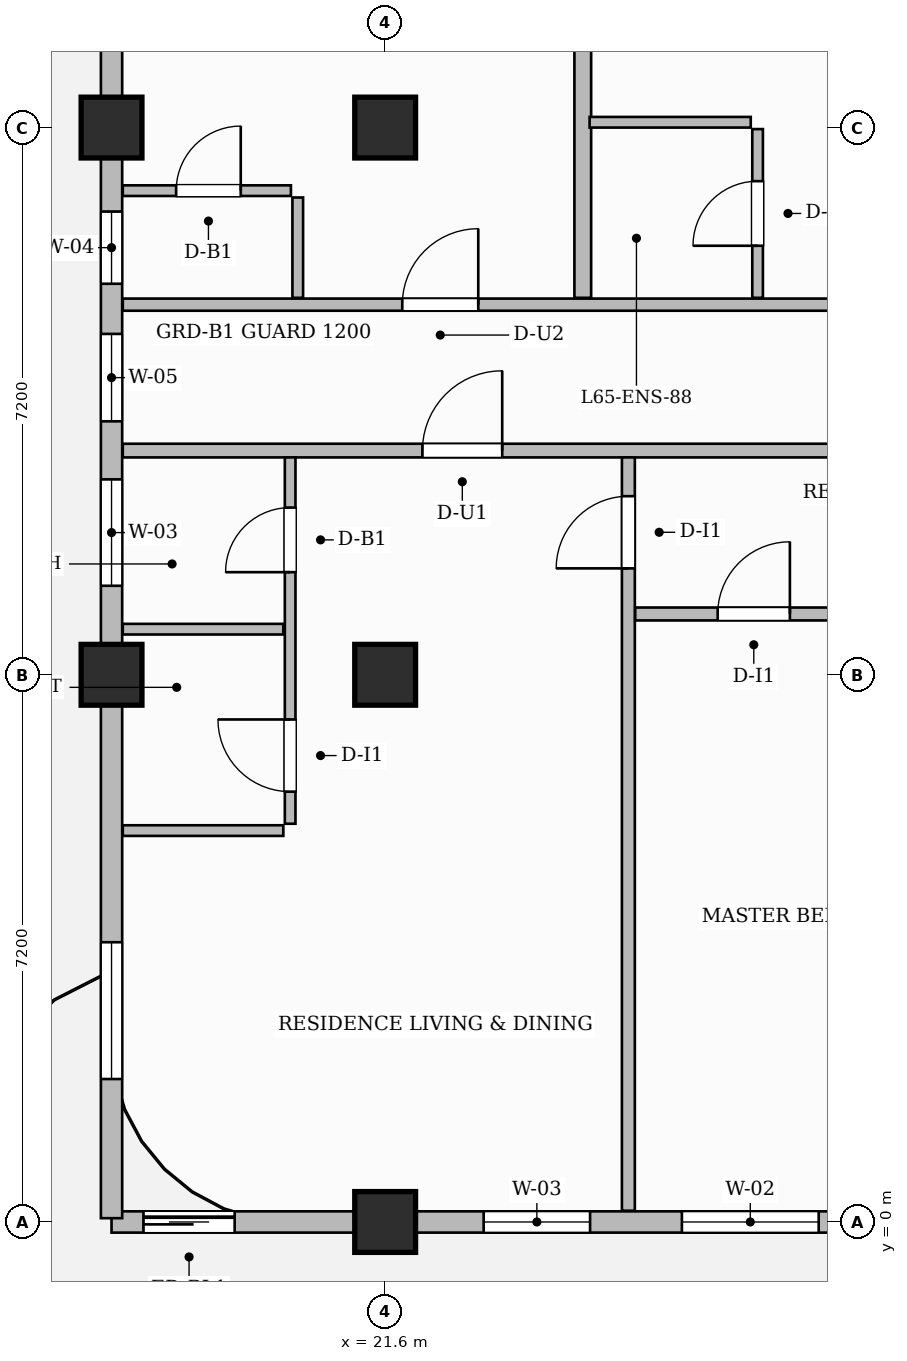
"""IFC4 building model, lengths in metres.
Left out: names, types, materials, properties, quantities, classifications, styles, units other than length and angle.
Written with IfcOpenShell. Run it as: python <this file> out.ifc"""

import sys

from ifc_helpers import new_model, si_unit, direction, frame, frame_2d, origin, origin_2d, place, context, subcontext, project, spatial, rectangle, extrude, source, transform, mapped, element, fill, save


model = new_model("IFC4")
c1 = context("Model", 3, precision=1e-05, world=origin(), true_north=direction((0.0, 1.0)))
c2 = subcontext(c1, "Body", "Model", "MODEL_VIEW")
j1 = project(units=[si_unit("LENGTHUNIT", "METRE"), si_unit("PLANEANGLEUNIT", "RADIAN")], contexts=[c1])
p1 = place(None, origin())
s1 = spatial("IfcSite", under=j1, at=p1, CompositionType="ELEMENT")
p2 = place(p1, origin())
s2 = spatial("IfcBuilding", under=s1, at=p2, CompositionType="ELEMENT")
p3 = place(p2, frame((0.0, 0.0, 259.65)))
s3 = spatial("IfcBuildingStorey", under=s2, at=p3, CompositionType="ELEMENT", Elevation=259.65)
m1 = source(origin(), c2, "Body", "SweptSolid", [
    extrude(rectangle(XDim=0.8, YDim=0.8, at=origin_2d()), origin(), (0.0, 0.0, 1.0), 3.85),
])
for number, where, z_axis, x_axis in (
    (1, (21.6, 0.0, 0.0), (0.0, 0.0, 1.0), (1.0, 0.0, 0.0)),
    (2, (21.6, 7.2, 0.0), (0.0, 0.0, 1.0), (1.0, 0.0, 0.0)),
    (3, (21.6, 14.4, 0.0), (0.0, 0.0, 1.0), (1.0, 0.0, 0.0)),
    (4, (18.0, 7.2, 0.0), (0.0, 0.0, 1.0), (1.0, 0.0, 0.0)),
    (5, (18.0, 14.4, 0.0), (0.0, 0.0, 1.0), (1.0, 0.0, 0.0)),
):
    element("IfcColumn", number, at=place(p3, frame(where, z_axis=z_axis, x_axis=x_axis)), inside=s3, PredefinedType="COLUMN", context=c2, shape_type="MappedRepresentation", body=[
        mapped(m1, transform((0.0, 0.0, 0.0), scale=1.0)),
    ])
p4 = place(p3, frame((18.148, 10.15, 0.0), z_axis=(0.0, 0.0, 1.0), x_axis=(1.0, 0.0, 0.0)))
e6 = element("IfcWall", 6, at=p4, inside=s3, PredefinedType="PARTITIONING", context=c2, shape_type="SweptSolid", body=[
    extrude(rectangle(XDim=11.962, YDim=0.18, at=frame_2d((5.981, 0.0))), origin(), (0.0, 0.0, 1.0), 3.6),
])
p5 = place(p4, frame((3.942, 0.0, 0.0)))
e7 = element("IfcOpeningElement", 7, at=p5, cuts=e6, PredefinedType="OPENING", context=c2, shape_type="SweptSolid", body=[
    extrude(rectangle(XDim=1.05, YDim=2.25, at=frame_2d((0.525, 1.125))), frame((0.0, 0.1, 0.0), z_axis=(0.0, -1.0, 0.0), x_axis=(1.0, 0.0, 0.0)), (0.0, 0.0, 1.0), 0.2),
])
p6 = place(p3, frame((18.148, 12.07, 0.0), z_axis=(0.0, 0.0, 1.0), x_axis=(1.0, 0.0, 0.0)))
e8 = element("IfcWall", 8, at=p6, inside=s3, PredefinedType="PARTITIONING", context=c2, shape_type="SweptSolid", body=[
    extrude(rectangle(XDim=11.962, YDim=0.16, at=frame_2d((5.981, 0.0))), origin(), (0.0, 0.0, 1.0), 3.6),
])
p7 = place(p6, frame((3.677, 0.0, 0.0)))
e9 = element("IfcOpeningElement", 9, at=p7, cuts=e8, PredefinedType="OPENING", context=c2, shape_type="SweptSolid", body=[
    extrude(rectangle(XDim=1.0, YDim=2.2, at=frame_2d((0.5, 1.1))), frame((0.0, 0.09, 0.0), z_axis=(0.0, -1.0, 0.0), x_axis=(1.0, 0.0, 0.0)), (0.0, 0.0, 1.0), 0.18),
])
p8 = place(p6, frame((9.677, 0.0, 0.0)))
e10 = element("IfcOpeningElement", 10, at=p8, cuts=e8, PredefinedType="OPENING", context=c2, shape_type="SweptSolid", body=[
    extrude(rectangle(XDim=1.05, YDim=2.25, at=frame_2d((0.525, 1.125))), frame((0.0, 0.09, 0.0), z_axis=(0.0, -1.0, 0.0), x_axis=(1.0, 0.0, 0.0)), (0.0, 0.0, 1.0), 0.18),
])
p9 = place(p3, frame((20.35, 5.24, 0.0), z_axis=(0.0, 0.0, 1.0), x_axis=(0.0, 1.0, 0.0)))
e11 = element("IfcWall", 11, at=p9, inside=s3, PredefinedType="PARTITIONING", context=c2, shape_type="SweptSolid", body=[
    extrude(rectangle(XDim=4.82, YDim=0.14, at=frame_2d((2.41, 0.0))), origin(), (0.0, 0.0, 1.0), 3.6),
])
p10 = place(p9, frame((0.422, 0.0, 0.0)))
e12 = element("IfcOpeningElement", 12, at=p10, cuts=e11, PredefinedType="OPENING", context=c2, shape_type="SweptSolid", body=[
    extrude(rectangle(XDim=0.95, YDim=2.15, at=frame_2d((0.475, 1.075))), frame((0.0, 0.08, 0.0), z_axis=(0.0, -1.0, 0.0), x_axis=(1.0, 0.0, 0.0)), (0.0, 0.0, 1.0), 0.16),
])
p11 = place(p9, frame((3.31, 0.0, 0.0)))
e13 = element("IfcOpeningElement", 13, at=p11, cuts=e11, PredefinedType="OPENING", context=c2, shape_type="SweptSolid", body=[
    extrude(rectangle(XDim=0.85, YDim=2.1, at=frame_2d((0.425, 1.05))), frame((0.0, 0.08, 0.0), z_axis=(0.0, -1.0, 0.0), x_axis=(1.0, 0.0, 0.0)), (0.0, 0.0, 1.0), 0.16),
])
for number, where, z_axis, x_axis in (
    (14, (18.148, 7.8, 0.0), (0.0, 0.0, 1.0), (1.0, 0.0, 0.0)),
    (15, (18.148, 5.15, 0.0), (0.0, 0.0, 1.0), (1.0, 0.0, 0.0)),
):
    element("IfcWall", number, at=place(p3, frame(where, z_axis=z_axis, x_axis=x_axis)), inside=s3, PredefinedType="PARTITIONING", context=c2, shape_type="SweptSolid", body=[
        extrude(rectangle(XDim=2.112, YDim=0.14, at=frame_2d((1.056, 0.0))), origin(), (0.0, 0.0, 1.0), 3.6),
    ])
p12 = place(p3, frame((24.8, 0.148, 0.0), z_axis=(0.0, 0.0, 1.0), x_axis=(0.0, 1.0, 0.0)))
e16 = element("IfcWall", 16, at=p12, inside=s3, PredefinedType="PARTITIONING", context=c2, shape_type="SweptSolid", body=[
    extrude(rectangle(XDim=9.912, YDim=0.17, at=frame_2d((4.956, 0.0))), origin(), (0.0, 0.0, 1.0), 3.6),
])
p13 = place(p12, frame((8.452, 0.0, 0.0)))
e17 = element("IfcOpeningElement", 17, at=p13, cuts=e16, PredefinedType="OPENING", context=c2, shape_type="SweptSolid", body=[
    extrude(rectangle(XDim=0.95, YDim=2.15, at=frame_2d((0.475, 1.075))), frame((0.0, 0.095, 0.0), z_axis=(0.0, -1.0, 0.0), x_axis=(1.0, 0.0, 0.0)), (0.0, 0.0, 1.0), 0.19),
])
p14 = place(p3, frame((24.89, 8.0, 0.0), z_axis=(0.0, 0.0, 1.0), x_axis=(1.0, 0.0, 0.0)))
e18 = element("IfcWall", 18, at=p14, inside=s3, PredefinedType="PARTITIONING", context=c2, shape_type="SweptSolid", body=[
    extrude(rectangle(XDim=5.22, YDim=0.17, at=frame_2d((2.61, 0.0))), origin(), (0.0, 0.0, 1.0), 3.6),
])
p15 = place(p14, frame((1.085, 0.0, 0.0)))
e19 = element("IfcOpeningElement", 19, at=p15, cuts=e18, PredefinedType="OPENING", context=c2, shape_type="SweptSolid", body=[
    extrude(rectangle(XDim=0.95, YDim=2.15, at=frame_2d((0.475, 1.075))), frame((0.0, 0.095, 0.0), z_axis=(0.0, -1.0, 0.0), x_axis=(1.0, 0.0, 0.0)), (0.0, 0.0, 1.0), 0.19),
])
p16 = place(p3, frame((24.2, 12.16, 0.0), z_axis=(0.0, 0.0, 1.0), x_axis=(0.0, 1.0, 0.0)))
e20 = element("IfcWall", 20, at=p16, inside=s3, PredefinedType="PARTITIONING", context=c2, shape_type="SweptSolid", body=[
    extrude(rectangle(XDim=9.292, YDim=0.22, at=frame_2d((4.646, 0.0))), origin(), (0.0, 0.0, 1.0), 3.6),
])
p17 = place(p3, frame((20.45, 12.16, 0.0), z_axis=(0.0, 0.0, 1.0), x_axis=(0.0, 1.0, 0.0)))
e21 = element("IfcWall", 21, at=p17, inside=s3, PredefinedType="PARTITIONING", context=c2, shape_type="SweptSolid", body=[
    extrude(rectangle(XDim=1.32, YDim=0.14, at=frame_2d((0.66, 0.0))), origin(), (0.0, 0.0, 1.0), 3.6),
])
p18 = place(p3, frame((18.148, 13.57, 0.0), z_axis=(0.0, 0.0, 1.0), x_axis=(1.0, 0.0, 0.0)))
e22 = element("IfcWall", 22, at=p18, inside=s3, PredefinedType="PARTITIONING", context=c2, shape_type="SweptSolid", body=[
    extrude(rectangle(XDim=2.212, YDim=0.14, at=frame_2d((1.106, 0.0))), origin(), (0.0, 0.0, 1.0), 3.6),
])
p19 = place(p18, frame((0.702, 0.0, 0.0)))
e23 = element("IfcOpeningElement", 23, at=p19, cuts=e22, PredefinedType="OPENING", context=c2, shape_type="SweptSolid", body=[
    extrude(rectangle(XDim=0.85, YDim=2.1, at=frame_2d((0.425, 1.05))), frame((0.0, 0.08, 0.0), z_axis=(0.0, -1.0, 0.0), x_axis=(1.0, 0.0, 0.0)), (0.0, 0.0, 1.0), 0.16),
])
p20 = place(p3, frame((26.5, 12.16, 0.0), z_axis=(0.0, 0.0, 1.0), x_axis=(0.0, 1.0, 0.0)))
e24 = element("IfcWall", 24, at=p20, inside=s3, PredefinedType="PARTITIONING", context=c2, shape_type="SweptSolid", body=[
    extrude(rectangle(XDim=2.22, YDim=0.14, at=frame_2d((1.11, 0.0))), origin(), (0.0, 0.0, 1.0), 3.6),
])
p21 = place(p20, frame((0.685, 0.0, 0.0)))
e25 = element("IfcOpeningElement", 25, at=p21, cuts=e24, PredefinedType="OPENING", context=c2, shape_type="SweptSolid", body=[
    extrude(rectangle(XDim=0.85, YDim=2.1, at=frame_2d((0.425, 1.05))), frame((0.0, 0.08, 0.0), z_axis=(0.0, -1.0, 0.0), x_axis=(1.0, 0.0, 0.0)), (0.0, 0.0, 1.0), 0.16),
])
p22 = place(p3, frame((24.29, 14.47, 0.0), z_axis=(0.0, 0.0, 1.0), x_axis=(1.0, 0.0, 0.0)))
e26 = element("IfcWall", 26, at=p22, inside=s3, PredefinedType="PARTITIONING", context=c2, shape_type="SweptSolid", body=[
    extrude(rectangle(XDim=2.12, YDim=0.14, at=frame_2d((1.06, 0.0))), origin(), (0.0, 0.0, 1.0), 3.185),
])
p23 = place(p3, frame((18.0, 0.0, 0.0), z_axis=(0.0, 0.0, 1.0), x_axis=(1.0, 0.0, 0.0)))
e27 = element("IfcWall", 27, at=p23, inside=s3, PredefinedType="SOLIDWALL", context=c2, shape_type="SweptSolid", body=[
    extrude(rectangle(XDim=31.8, YDim=0.28, at=frame_2d((15.9, 0.0))), origin(), (0.0, 0.0, 1.0), 3.185),
])
p24 = place(p23, frame((0.42, 0.0, 0.0)))
e28 = element("IfcOpeningElement", 28, at=p24, cuts=e27, PredefinedType="OPENING", context=c2, shape_type="SweptSolid", body=[
    extrude(rectangle(XDim=1.2, YDim=2.2, at=frame_2d((0.6, 1.1))), frame((0.0, 0.15, 0.0), z_axis=(0.0, -1.0, 0.0), x_axis=(1.0, 0.0, 0.0)), (0.0, 0.0, 1.0), 0.3),
])
p25 = place(p23, frame((4.896, 0.0, 0.8)))
e29 = element("IfcOpeningElement", 29, at=p25, cuts=e27, PredefinedType="OPENING", context=c2, shape_type="SweptSolid", body=[
    extrude(rectangle(XDim=1.4, YDim=1.85, at=frame_2d((0.7, 0.925))), frame((0.0, 0.15, 0.0), z_axis=(0.0, -1.0, 0.0), x_axis=(1.0, 0.0, 0.0)), (0.0, 0.0, 1.0), 0.3),
])
p26 = place(p23, frame((7.504, 0.0, 0.8)))
e30 = element("IfcOpeningElement", 30, at=p26, cuts=e27, PredefinedType="OPENING", context=c2, shape_type="SweptSolid", body=[
    extrude(rectangle(XDim=1.8, YDim=1.85, at=frame_2d((0.9, 0.925))), frame((0.0, 0.15, 0.0), z_axis=(0.0, -1.0, 0.0), x_axis=(1.0, 0.0, 0.0)), (0.0, 0.0, 1.0), 0.3),
])
p27 = place(p23, frame((13.204, 0.0, 0.8)))
e31 = element("IfcOpeningElement", 31, at=p27, cuts=e27, PredefinedType="OPENING", context=c2, shape_type="SweptSolid", body=[
    extrude(rectangle(XDim=1.8, YDim=1.85, at=frame_2d((0.9, 0.925))), frame((0.0, 0.15, 0.0), z_axis=(0.0, -1.0, 0.0), x_axis=(1.0, 0.0, 0.0)), (0.0, 0.0, 1.0), 0.3),
])
p28 = place(p23, frame((18.796, 0.0, 0.8)))
e32 = element("IfcOpeningElement", 32, at=p28, cuts=e27, PredefinedType="OPENING", context=c2, shape_type="SweptSolid", body=[
    extrude(rectangle(XDim=1.8, YDim=1.85, at=frame_2d((0.9, 0.925))), frame((0.0, 0.15, 0.0), z_axis=(0.0, -1.0, 0.0), x_axis=(1.0, 0.0, 0.0)), (0.0, 0.0, 1.0), 0.3),
])
p29 = place(p23, frame((22.029, 0.0, 0.8)))
e33 = element("IfcOpeningElement", 33, at=p29, cuts=e27, PredefinedType="OPENING", context=c2, shape_type="SweptSolid", body=[
    extrude(rectangle(XDim=0.95, YDim=1.75, at=frame_2d((0.475, 0.875))), frame((0.0, 0.15, 0.0), z_axis=(0.0, -1.0, 0.0), x_axis=(1.0, 0.0, 0.0)), (0.0, 0.0, 1.0), 0.3),
])
p30 = place(p23, frame((25.475, 0.0, 0.8)))
e34 = element("IfcOpeningElement", 34, at=p30, cuts=e27, PredefinedType="OPENING", context=c2, shape_type="SweptSolid", body=[
    extrude(rectangle(XDim=1.8, YDim=1.85, at=frame_2d((0.9, 0.925))), frame((0.0, 0.15, 0.0), z_axis=(0.0, -1.0, 0.0), x_axis=(1.0, 0.0, 0.0)), (0.0, 0.0, 1.0), 0.3),
])
p31 = place(p23, frame((28.525, 0.0, 0.8)))
e35 = element("IfcOpeningElement", 35, at=p31, cuts=e27, PredefinedType="OPENING", context=c2, shape_type="SweptSolid", body=[
    extrude(rectangle(XDim=1.8, YDim=1.85, at=frame_2d((0.9, 0.925))), frame((0.0, 0.15, 0.0), z_axis=(0.0, -1.0, 0.0), x_axis=(1.0, 0.0, 0.0)), (0.0, 0.0, 1.0), 0.3),
])
p32 = place(p3, frame((18.0, 0.05, 0.0), z_axis=(0.0, 0.0, 1.0), x_axis=(0.0, 1.0, 0.0)))
e36 = element("IfcWall", 36, at=p32, inside=s3, PredefinedType="SOLIDWALL", context=c2, shape_type="SweptSolid", body=[
    extrude(rectangle(XDim=21.5, YDim=0.28, at=frame_2d((10.75, 0.0))), origin(), (0.0, 0.0, 1.0), 3.6),
])
p33 = place(p32, frame((1.831, 0.0, 0.8)))
e37 = element("IfcOpeningElement", 37, at=p33, cuts=e36, PredefinedType="OPENING", context=c2, shape_type="SweptSolid", body=[
    extrude(rectangle(XDim=1.8, YDim=1.85, at=frame_2d((0.9, 0.925))), frame((0.0, 0.15, 0.0), z_axis=(0.0, -1.0, 0.0), x_axis=(1.0, 0.0, 0.0)), (0.0, 0.0, 1.0), 0.3),
])
p34 = place(p32, frame((8.321, 0.0, 0.8)))
e38 = element("IfcOpeningElement", 38, at=p34, cuts=e36, PredefinedType="OPENING", context=c2, shape_type="SweptSolid", body=[
    extrude(rectangle(XDim=1.4, YDim=1.85, at=frame_2d((0.7, 0.925))), frame((0.0, 0.15, 0.0), z_axis=(0.0, -1.0, 0.0), x_axis=(1.0, 0.0, 0.0)), (0.0, 0.0, 1.0), 0.3),
])
p35 = place(p32, frame((10.485, 0.0, 0.8)))
e39 = element("IfcOpeningElement", 39, at=p35, cuts=e36, PredefinedType="OPENING", context=c2, shape_type="SweptSolid", body=[
    extrude(rectangle(XDim=1.15, YDim=1.8, at=frame_2d((0.575, 0.9))), frame((0.0, 0.15, 0.0), z_axis=(0.0, -1.0, 0.0), x_axis=(1.0, 0.0, 0.0)), (0.0, 0.0, 1.0), 0.3),
])
p36 = place(p32, frame((12.295, 0.0, 0.8)))
e40 = element("IfcOpeningElement", 40, at=p36, cuts=e36, PredefinedType="OPENING", context=c2, shape_type="SweptSolid", body=[
    extrude(rectangle(XDim=0.95, YDim=1.75, at=frame_2d((0.475, 0.875))), frame((0.0, 0.15, 0.0), z_axis=(0.0, -1.0, 0.0), x_axis=(1.0, 0.0, 0.0)), (0.0, 0.0, 1.0), 0.3),
])
p37 = place(p32, frame((15.77, 0.0, 0.8)))
e41 = element("IfcOpeningElement", 41, at=p37, cuts=e36, PredefinedType="OPENING", context=c2, shape_type="SweptSolid", body=[
    extrude(rectangle(XDim=1.8, YDim=1.85, at=frame_2d((0.9, 0.925))), frame((0.0, 0.15, 0.0), z_axis=(0.0, -1.0, 0.0), x_axis=(1.0, 0.0, 0.0)), (0.0, 0.0, 1.0), 0.3),
])
p38 = place(p32, frame((18.71, 0.0, 0.8)))
e42 = element("IfcOpeningElement", 42, at=p38, cuts=e36, PredefinedType="OPENING", context=c2, shape_type="SweptSolid", body=[
    extrude(rectangle(XDim=1.8, YDim=1.85, at=frame_2d((0.9, 0.925))), frame((0.0, 0.15, 0.0), z_axis=(0.0, -1.0, 0.0), x_axis=(1.0, 0.0, 0.0)), (0.0, 0.0, 1.0), 0.3),
])
m2 = source(origin(), c2, "Body", "SweptSolid", [
    extrude(rectangle(XDim=0.95, YDim=2.15, at=frame_2d((0.475, 1.075))), frame((0.0, 0.025, 0.0), z_axis=(0.0, -1.0, 0.0), x_axis=(1.0, 0.0, 0.0)), (0.0, 0.0, 1.0), 0.05),
])
p39 = place(p10, origin())
e43 = element("IfcDoor", 43, at=p39, inside=s3, OperationType="SINGLE_SWING_RIGHT", PredefinedType="DOOR", context=c2, shape_type="MappedRepresentation", body=[
    mapped(m2, transform((0.0, 0.0, 0.0), scale=1.0)),
])
fill(e12, e43)
m3 = source(origin(), c2, "Body", "SweptSolid", [
    extrude(rectangle(XDim=0.85, YDim=2.1, at=frame_2d((0.425, 1.05))), frame((0.0, 0.025, 0.0), z_axis=(0.0, -1.0, 0.0), x_axis=(1.0, 0.0, 0.0)), (0.0, 0.0, 1.0), 0.05),
])
p40 = place(p11, origin())
e44 = element("IfcDoor", 44, at=p40, inside=s3, OperationType="SINGLE_SWING_LEFT", PredefinedType="DOOR", context=c2, shape_type="MappedRepresentation", body=[
    mapped(m3, transform((0.0, 0.0, 0.0), scale=1.0)),
])
fill(e13, e44)
m4 = source(origin(), c2, "Body", "SweptSolid", [
    extrude(rectangle(XDim=1.05, YDim=2.25, at=frame_2d((0.525, 1.125))), frame((0.0, 0.025, 0.0), z_axis=(0.0, -1.0, 0.0), x_axis=(1.0, 0.0, 0.0)), (0.0, 0.0, 1.0), 0.05),
])
p41 = place(p5, origin())
e45 = element("IfcDoor", 45, at=p41, inside=s3, OperationType="SINGLE_SWING_RIGHT", PredefinedType="DOOR", context=c2, shape_type="MappedRepresentation", body=[
    mapped(m4, transform((0.0, 0.0, 0.0), scale=1.0)),
])
fill(e7, e45)
p42 = place(p13, origin())
e46 = element("IfcDoor", 46, at=p42, inside=s3, OperationType="SINGLE_SWING_LEFT", PredefinedType="DOOR", context=c2, shape_type="MappedRepresentation", body=[
    mapped(m2, transform((0.0, 0.0, 0.0), scale=1.0)),
])
fill(e17, e46)
p43 = place(p15, origin())
e47 = element("IfcDoor", 47, at=p43, inside=s3, OperationType="SINGLE_SWING_RIGHT", PredefinedType="DOOR", context=c2, shape_type="MappedRepresentation", body=[
    mapped(m2, transform((0.0, 0.0, 0.0), scale=1.0)),
])
fill(e19, e47)
p44 = place(p19, origin())
e48 = element("IfcDoor", 48, at=p44, inside=s3, OperationType="SINGLE_SWING_RIGHT", PredefinedType="DOOR", context=c2, shape_type="MappedRepresentation", body=[
    mapped(m3, transform((0.0, 0.0, 0.0), scale=1.0)),
])
fill(e23, e48)
m5 = source(origin(), c2, "Body", "SweptSolid", [
    extrude(rectangle(XDim=1.0, YDim=2.2, at=frame_2d((0.5, 1.1))), frame((0.0, 0.025, 0.0), z_axis=(0.0, -1.0, 0.0), x_axis=(1.0, 0.0, 0.0)), (0.0, 0.0, 1.0), 0.05),
])
p45 = place(p7, origin())
e49 = element("IfcDoor", 49, at=p45, inside=s3, OperationType="SINGLE_SWING_RIGHT", PredefinedType="DOOR", context=c2, shape_type="MappedRepresentation", body=[
    mapped(m5, transform((0.0, 0.0, 0.0), scale=1.0)),
])
fill(e9, e49)
p46 = place(p21, origin())
e50 = element("IfcDoor", 50, at=p46, inside=s3, OperationType="SINGLE_SWING_LEFT", PredefinedType="DOOR", context=c2, shape_type="MappedRepresentation", body=[
    mapped(m3, transform((0.0, 0.0, 0.0), scale=1.0)),
])
fill(e25, e50)
m6 = source(origin(), c2, "Body", "SweptSolid", [
    extrude(rectangle(XDim=1.2, YDim=2.2, at=frame_2d((0.6, 1.1))), frame((0.0, 0.025, 0.0), z_axis=(0.0, -1.0, 0.0), x_axis=(1.0, 0.0, 0.0)), (0.0, 0.0, 1.0), 0.05),
])
p47 = place(p24, origin())
e51 = element("IfcDoor", 51, at=p47, inside=s3, OperationType="SLIDING_TO_LEFT", PredefinedType="DOOR", context=c2, shape_type="MappedRepresentation", body=[
    mapped(m6, transform((0.0, 0.0, 0.0), scale=1.0)),
])
fill(e28, e51)
m7 = source(origin(), c2, "Body", "SweptSolid", [
    extrude(rectangle(XDim=1.4, YDim=1.85, at=frame_2d((0.7, 0.925))), frame((0.0, 0.03, 0.0), z_axis=(0.0, -1.0, 0.0), x_axis=(1.0, 0.0, 0.0)), (0.0, 0.0, 1.0), 0.06),
])
p48 = place(p25, origin())
e52 = element("IfcWindow", 52, at=p48, inside=s3, PartitioningType="SINGLE_PANEL", PredefinedType="WINDOW", context=c2, shape_type="MappedRepresentation", body=[
    mapped(m7, transform((0.0, 0.0, 0.0), scale=1.0)),
])
fill(e29, e52)
m8 = source(origin(), c2, "Body", "SweptSolid", [
    extrude(rectangle(XDim=1.8, YDim=1.85, at=frame_2d((0.9, 0.925))), frame((0.0, 0.03, 0.0), z_axis=(0.0, -1.0, 0.0), x_axis=(1.0, 0.0, 0.0)), (0.0, 0.0, 1.0), 0.06),
])
p49 = place(p26, origin())
e53 = element("IfcWindow", 53, at=p49, inside=s3, PartitioningType="DOUBLE_PANEL_VERTICAL", PredefinedType="WINDOW", context=c2, shape_type="MappedRepresentation", body=[
    mapped(m8, transform((0.0, 0.0, 0.0), scale=1.0)),
])
fill(e30, e53)
p50 = place(p33, origin())
e54 = element("IfcWindow", 54, at=p50, inside=s3, PartitioningType="DOUBLE_PANEL_VERTICAL", PredefinedType="WINDOW", context=c2, shape_type="MappedRepresentation", body=[
    mapped(m8, transform((0.0, 0.0, 0.0), scale=1.0)),
])
fill(e37, e54)
p51 = place(p34, origin())
e55 = element("IfcWindow", 55, at=p51, inside=s3, PartitioningType="SINGLE_PANEL", PredefinedType="WINDOW", context=c2, shape_type="MappedRepresentation", body=[
    mapped(m7, transform((0.0, 0.0, 0.0), scale=1.0)),
])
fill(e38, e55)
m9 = source(origin(), c2, "Body", "SweptSolid", [
    extrude(rectangle(XDim=1.15, YDim=1.8, at=frame_2d((0.575, 0.9))), frame((0.0, 0.03, 0.0), z_axis=(0.0, -1.0, 0.0), x_axis=(1.0, 0.0, 0.0)), (0.0, 0.0, 1.0), 0.06),
])
p52 = place(p35, origin())
e56 = element("IfcWindow", 56, at=p52, inside=s3, PartitioningType="SINGLE_PANEL", PredefinedType="WINDOW", context=c2, shape_type="MappedRepresentation", body=[
    mapped(m9, transform((0.0, 0.0, 0.0), scale=1.0)),
])
fill(e39, e56)
m10 = source(origin(), c2, "Body", "SweptSolid", [
    extrude(rectangle(XDim=0.95, YDim=1.75, at=frame_2d((0.475, 0.875))), frame((0.0, 0.03, 0.0), z_axis=(0.0, -1.0, 0.0), x_axis=(1.0, 0.0, 0.0)), (0.0, 0.0, 1.0), 0.06),
])
p53 = place(p36, origin())
e57 = element("IfcWindow", 57, at=p53, inside=s3, PartitioningType="SINGLE_PANEL", PredefinedType="WINDOW", context=c2, shape_type="MappedRepresentation", body=[
    mapped(m10, transform((0.0, 0.0, 0.0), scale=1.0)),
])
fill(e40, e57)
save(model, sys.argv[1])
